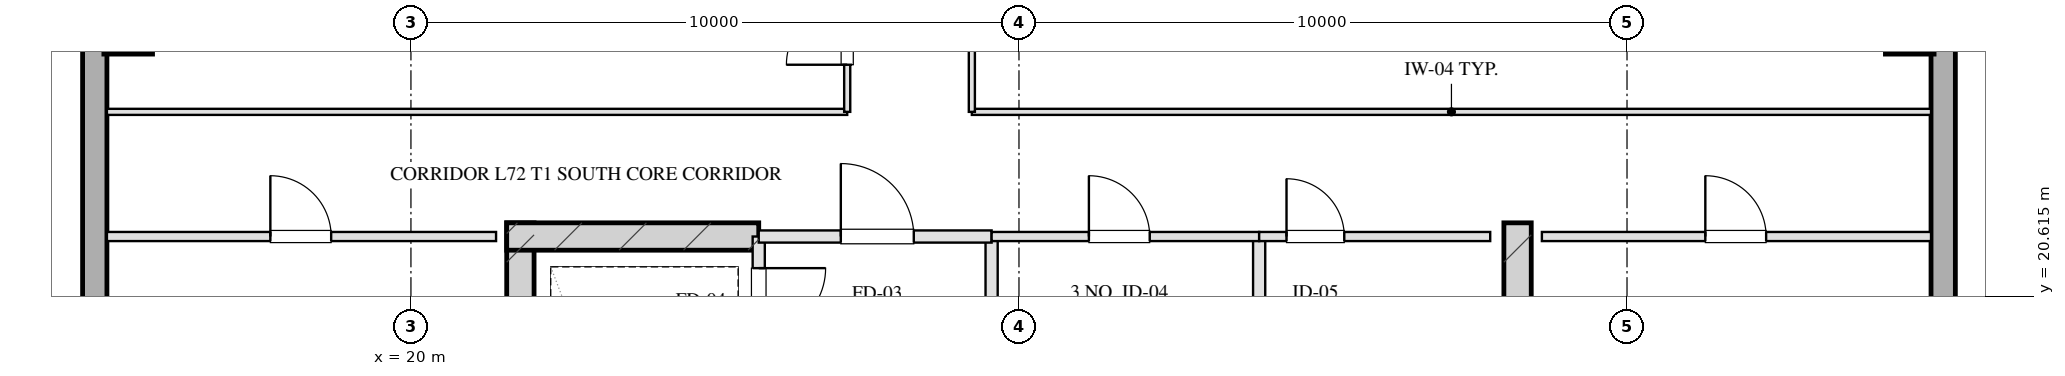
"""IFC4 building model, lengths in metres.
Left out: names, types, materials, properties, quantities, classifications, styles, units other than length and angle.
Written with IfcOpenShell. Run it as: python <this file> out.ifc"""

import sys

from ifc_helpers import new_model, si_unit, direction, frame, frame_2d, origin, origin_2d, place, context, subcontext, project, spatial, rectangle, hollow_rectangle, extrude, element, fill, save


model = new_model("IFC4")
c1 = context("Model", 3, precision=1e-05, world=origin(), true_north=direction((0.0, 1.0)))
c2 = subcontext(c1, "Body", "Model", "MODEL_VIEW")
j1 = project(units=[si_unit("LENGTHUNIT", "METRE"), si_unit("PLANEANGLEUNIT", "RADIAN")], contexts=[c1])
p1 = place(None, origin())
s1 = spatial("IfcSite", under=j1, at=p1, CompositionType="ELEMENT")
p2 = place(p1, origin())
s2 = spatial("IfcBuilding", under=s1, at=p2, CompositionType="ELEMENT")
p3 = place(p2, frame((0.0, 0.0, 263.2)))
s3 = spatial("IfcBuildingStorey", under=s2, at=p3, CompositionType="ELEMENT", Elevation=263.2)
for number, where, z_axis, x_axis in (
    (1, (21.8, 21.825, 0.0), (0.0, 0.0, 1.0), (0.0, -1.0, 0.0)),
    (2, (38.2, 21.825, 0.0), (0.0, 0.0, 1.0), (0.0, -1.0, 0.0)),
):
    element("IfcWall", number, at=place(p3, frame(where, z_axis=z_axis, x_axis=x_axis)), inside=s3, PredefinedType="SHEAR", context=c2, shape_type="SweptSolid", body=[
        extrude(rectangle(XDim=9.33, YDim=0.45, at=frame_2d((4.665, 0.0))), origin(), (0.0, 0.0, 1.0), 3.2),
    ])
p4 = place(p3, frame((21.575, 21.6, 0.0), z_axis=(0.0, 0.0, 1.0), x_axis=(1.0, 0.0, 0.0)))
e3 = element("IfcWall", 3, at=p4, inside=s3, PredefinedType="SHEAR", context=c2, shape_type="SweptSolid", body=[
    extrude(rectangle(XDim=4.145, YDim=0.45, at=frame_2d((2.073, 0.0))), origin(), (0.0, 0.0, 1.0), 3.2),
])
for number, where, z_axis, x_axis in (
    (4, (15.35, 25.0, 0.0), (0.0, 0.0, 1.0), (1.0, 0.0, 0.0)),
    (5, (44.65, 25.0, 0.0), (0.0, 0.0, 1.0), (1.0, 0.0, 0.0)),
):
    element("IfcColumn", number, at=place(p3, frame(where, z_axis=z_axis, x_axis=x_axis)), inside=s3, PredefinedType="COLUMN", context=c2, shape_type="SweptSolid", body=[
        extrude(hollow_rectangle(XDim=0.8, YDim=0.8, WallThickness=0.028, at=origin_2d()), origin(), (0.0, 0.0, 1.0), 3.201),
    ])
p5 = place(p3, frame((14.8, 13.1, 0.0), z_axis=(0.0, 0.0, 1.0), x_axis=(0.0, 1.0, 0.0)))
e6 = element("IfcWall", 6, at=p5, inside=s3, PredefinedType="SOLIDWALL", context=c2, shape_type="SweptSolid", body=[
    extrude(rectangle(XDim=41.8, YDim=0.4, at=frame_2d((20.9, 0.0))), origin(), (0.0, 0.0, 1.0), 2.36),
])
p6 = place(p5, frame((13.525, 0.0, 0.75)))
e7 = element("IfcOpeningElement", 7, at=p6, cuts=e6, PredefinedType="OPENING", context=c2, shape_type="SweptSolid", body=[
    extrude(rectangle(XDim=1.95, YDim=1.21, at=frame_2d((0.975, 0.605))), frame((0.0, 0.21, 0.0), z_axis=(0.0, -1.0, 0.0), x_axis=(1.0, 0.0, 0.0)), (0.0, 0.0, 1.0), 0.42),
])
p7 = place(p5, frame((17.325, 0.0, 0.75)))
e8 = element("IfcOpeningElement", 8, at=p7, cuts=e6, PredefinedType="OPENING", context=c2, shape_type="SweptSolid", body=[
    extrude(rectangle(XDim=1.95, YDim=1.21, at=frame_2d((0.975, 0.605))), frame((0.0, 0.21, 0.0), z_axis=(0.0, -1.0, 0.0), x_axis=(1.0, 0.0, 0.0)), (0.0, 0.0, 1.0), 0.42),
])
p8 = place(p5, frame((22.525, 0.0, 0.75)))
e9 = element("IfcOpeningElement", 9, at=p8, cuts=e6, PredefinedType="OPENING", context=c2, shape_type="SweptSolid", body=[
    extrude(rectangle(XDim=1.95, YDim=1.21, at=frame_2d((0.975, 0.605))), frame((0.0, 0.21, 0.0), z_axis=(0.0, -1.0, 0.0), x_axis=(1.0, 0.0, 0.0)), (0.0, 0.0, 1.0), 0.42),
])
p9 = place(p5, frame((26.325, 0.0, 0.75)))
e10 = element("IfcOpeningElement", 10, at=p9, cuts=e6, PredefinedType="OPENING", context=c2, shape_type="SweptSolid", body=[
    extrude(rectangle(XDim=1.95, YDim=1.21, at=frame_2d((0.975, 0.605))), frame((0.0, 0.21, 0.0), z_axis=(0.0, -1.0, 0.0), x_axis=(1.0, 0.0, 0.0)), (0.0, 0.0, 1.0), 0.42),
])
p10 = place(p3, frame((45.2, 54.9, 0.0), z_axis=(0.0, 0.0, 1.0), x_axis=(0.0, -1.0, 0.0)))
e11 = element("IfcWall", 11, at=p10, inside=s3, PredefinedType="SOLIDWALL", context=c2, shape_type="SweptSolid", body=[
    extrude(rectangle(XDim=41.8, YDim=0.4, at=frame_2d((20.9, 0.0))), origin(), (0.0, 0.0, 1.0), 2.36),
])
p11 = place(p10, frame((26.325, 0.0, 0.75)))
e12 = element("IfcOpeningElement", 12, at=p11, cuts=e11, PredefinedType="OPENING", context=c2, shape_type="SweptSolid", body=[
    extrude(rectangle(XDim=1.95, YDim=1.21, at=frame_2d((0.975, 0.605))), frame((0.0, 0.21, 0.0), z_axis=(0.0, -1.0, 0.0), x_axis=(1.0, 0.0, 0.0)), (0.0, 0.0, 1.0), 0.42),
])
p12 = place(p10, frame((22.525, 0.0, 0.75)))
e13 = element("IfcOpeningElement", 13, at=p12, cuts=e11, PredefinedType="OPENING", context=c2, shape_type="SweptSolid", body=[
    extrude(rectangle(XDim=1.95, YDim=1.21, at=frame_2d((0.975, 0.605))), frame((0.0, 0.21, 0.0), z_axis=(0.0, -1.0, 0.0), x_axis=(1.0, 0.0, 0.0)), (0.0, 0.0, 1.0), 0.42),
])
p13 = place(p10, frame((17.325, 0.0, 0.75)))
e14 = element("IfcOpeningElement", 14, at=p13, cuts=e11, PredefinedType="OPENING", context=c2, shape_type="SweptSolid", body=[
    extrude(rectangle(XDim=1.95, YDim=1.21, at=frame_2d((0.975, 0.605))), frame((0.0, 0.21, 0.0), z_axis=(0.0, -1.0, 0.0), x_axis=(1.0, 0.0, 0.0)), (0.0, 0.0, 1.0), 0.42),
])
p14 = place(p10, frame((13.525, 0.0, 0.75)))
e15 = element("IfcOpeningElement", 15, at=p14, cuts=e11, PredefinedType="OPENING", context=c2, shape_type="SweptSolid", body=[
    extrude(rectangle(XDim=1.95, YDim=1.21, at=frame_2d((0.975, 0.605))), frame((0.0, 0.21, 0.0), z_axis=(0.0, -1.0, 0.0), x_axis=(1.0, 0.0, 0.0)), (0.0, 0.0, 1.0), 0.42),
])
p15 = place(p3, frame((25.72, 21.6, 0.0), z_axis=(0.0, 0.0, 1.0), x_axis=(0.0, -1.0, 0.0)))
e16 = element("IfcWall", 16, at=p15, inside=s3, PredefinedType="PARTITIONING", context=c2, shape_type="SweptSolid", body=[
    extrude(rectangle(XDim=1.9, YDim=0.2, at=frame_2d((0.95, 0.0))), origin(), (0.0, 0.0, 1.0), 2.925),
])
p16 = place(p15, frame((0.52, 0.0, 0.0)))
e17 = element("IfcOpeningElement", 17, at=p16, cuts=e16, PredefinedType="OPENING", context=c2, shape_type="SweptSolid", body=[
    extrude(rectangle(XDim=1.1, YDim=2.05, at=frame_2d((0.55, 1.025))), frame((0.0, 0.11, 0.0), z_axis=(0.0, -1.0, 0.0), x_axis=(1.0, 0.0, 0.0)), (0.0, 0.0, 1.0), 0.22),
])
p17 = place(p3, frame((29.55, 21.6, 0.0), z_axis=(0.0, 0.0, 1.0), x_axis=(0.0, -1.0, 0.0)))
e18 = element("IfcWall", 18, at=p17, inside=s3, PredefinedType="PARTITIONING", context=c2, shape_type="SweptSolid", body=[
    extrude(rectangle(XDim=8.43, YDim=0.2, at=frame_2d((4.215, 0.0))), origin(), (0.0, 0.0, 1.0), 2.925),
])
p18 = place(p3, frame((25.72, 21.6, 0.0), z_axis=(0.0, 0.0, 1.0), x_axis=(1.0, 0.0, 0.0)))
e19 = element("IfcWall", 19, at=p18, inside=s3, PredefinedType="PARTITIONING", context=c2, shape_type="SweptSolid", body=[
    extrude(rectangle(XDim=3.83, YDim=0.2, at=frame_2d((1.915, 0.0))), origin(), (0.0, 0.0, 1.0), 2.925),
])
p19 = place(p18, frame((1.35, 0.0, 0.0)))
e20 = element("IfcOpeningElement", 20, at=p19, cuts=e19, PredefinedType="OPENING", context=c2, shape_type="SweptSolid", body=[
    extrude(rectangle(XDim=1.2, YDim=2.05, at=frame_2d((0.6, 1.025))), frame((0.0, 0.11, 0.0), z_axis=(0.0, -1.0, 0.0), x_axis=(1.0, 0.0, 0.0)), (0.0, 0.0, 1.0), 0.22),
])
p20 = place(p3, frame((33.95, 21.6, 0.0), z_axis=(0.0, 0.0, 1.0), x_axis=(0.0, -1.0, 0.0)))
e21 = element("IfcWall", 21, at=p20, inside=s3, PredefinedType="PARTITIONING", context=c2, shape_type="SweptSolid", body=[
    extrude(rectangle(XDim=8.43, YDim=0.2, at=frame_2d((4.215, 0.0))), origin(), (0.0, 0.0, 1.0), 2.925),
])
p21 = place(p3, frame((29.55, 21.6, 0.0), z_axis=(0.0, 0.0, 1.0), x_axis=(1.0, 0.0, 0.0)))
e22 = element("IfcWall", 22, at=p21, inside=s3, PredefinedType="PARTITIONING", context=c2, shape_type="SweptSolid", body=[
    extrude(rectangle(XDim=4.4, YDim=0.15, at=frame_2d((2.2, 0.0))), origin(), (0.0, 0.0, 1.0), 2.925),
])
p22 = place(p21, frame((1.6, 0.0, 0.0)))
e23 = element("IfcOpeningElement", 23, at=p22, cuts=e22, PredefinedType="OPENING", context=c2, shape_type="SweptSolid", body=[
    extrude(rectangle(XDim=1.0, YDim=2.05, at=frame_2d((0.5, 1.025))), frame((0.0, 0.085, 0.0), z_axis=(0.0, -1.0, 0.0), x_axis=(1.0, 0.0, 0.0)), (0.0, 0.0, 1.0), 0.17),
])
p23 = place(p3, frame((33.95, 21.6, 0.0), z_axis=(0.0, 0.0, 1.0), x_axis=(1.0, 0.0, 0.0)))
e24 = element("IfcWall", 24, at=p23, inside=s3, PredefinedType="PARTITIONING", context=c2, shape_type="SweptSolid", body=[
    extrude(rectangle(XDim=3.8, YDim=0.15, at=frame_2d((1.9, 0.0))), origin(), (0.0, 0.0, 1.0), 2.925),
])
p24 = place(p23, frame((0.45, 0.0, 0.0)))
e25 = element("IfcOpeningElement", 25, at=p24, cuts=e24, PredefinedType="OPENING", context=c2, shape_type="SweptSolid", body=[
    extrude(rectangle(XDim=0.95, YDim=2.05, at=frame_2d((0.475, 1.025))), frame((0.0, 0.085, 0.0), z_axis=(0.0, -1.0, 0.0), x_axis=(1.0, 0.0, 0.0)), (0.0, 0.0, 1.0), 0.17),
])
p25 = place(p3, frame((15.0, 21.6, 0.0), z_axis=(0.0, 0.0, 1.0), x_axis=(1.0, 0.0, 0.0)))
e26 = element("IfcWall", 26, at=p25, inside=s3, PredefinedType="PARTITIONING", context=c2, shape_type="SweptSolid", body=[
    extrude(rectangle(XDim=6.4, YDim=0.15, at=frame_2d((3.2, 0.0))), origin(), (0.0, 0.0, 1.0), 2.925),
])
p26 = place(p25, frame((2.688, 0.0, 0.0)))
e27 = element("IfcOpeningElement", 27, at=p26, cuts=e26, PredefinedType="OPENING", context=c2, shape_type="SweptSolid", body=[
    extrude(rectangle(XDim=1.0, YDim=2.05, at=frame_2d((0.5, 1.025))), frame((0.0, 0.085, 0.0), z_axis=(0.0, -1.0, 0.0), x_axis=(1.0, 0.0, 0.0)), (0.0, 0.0, 1.0), 0.17),
])
p27 = place(p3, frame((38.6, 21.6, 0.0), z_axis=(0.0, 0.0, 1.0), x_axis=(1.0, 0.0, 0.0)))
e28 = element("IfcWall", 28, at=p27, inside=s3, PredefinedType="PARTITIONING", context=c2, shape_type="SweptSolid", body=[
    extrude(rectangle(XDim=6.4, YDim=0.15, at=frame_2d((3.2, 0.0))), origin(), (0.0, 0.0, 1.0), 2.925),
])
p28 = place(p27, frame((2.688, 0.0, 0.0)))
e29 = element("IfcOpeningElement", 29, at=p28, cuts=e28, PredefinedType="OPENING", context=c2, shape_type="SweptSolid", body=[
    extrude(rectangle(XDim=1.0, YDim=2.05, at=frame_2d((0.5, 1.025))), frame((0.0, 0.085, 0.0), z_axis=(0.0, -1.0, 0.0), x_axis=(1.0, 0.0, 0.0)), (0.0, 0.0, 1.0), 0.17),
])
p29 = place(p3, frame((15.0, 23.65, 0.0), z_axis=(0.0, 0.0, 1.0), x_axis=(1.0, 0.0, 0.0)))
e30 = element("IfcWall", 30, at=p29, inside=s3, PredefinedType="MOVABLE", context=c2, shape_type="SweptSolid", body=[
    extrude(rectangle(XDim=12.175, YDim=0.1, at=frame_2d((6.087, 0.0))), origin(), (0.0, 0.0, 1.0), 2.925),
])
p30 = place(p3, frame((29.225, 23.65, 0.0), z_axis=(0.0, 0.0, 1.0), x_axis=(1.0, 0.0, 0.0)))
e31 = element("IfcWall", 31, at=p30, inside=s3, PredefinedType="MOVABLE", context=c2, shape_type="SweptSolid", body=[
    extrude(rectangle(XDim=15.775, YDim=0.1, at=frame_2d((7.887, 0.0))), origin(), (0.0, 0.0, 1.0), 2.925),
])
p31 = place(p3, frame((27.175, 23.65, 0.0), z_axis=(0.0, 0.0, 1.0), x_axis=(0.0, 1.0, 0.0)))
e32 = element("IfcWall", 32, at=p31, inside=s3, PredefinedType="MOVABLE", context=c2, shape_type="SweptSolid", body=[
    extrude(rectangle(XDim=20.7, YDim=0.1, at=frame_2d((10.35, 0.0))), origin(), (0.0, 0.0, 1.0), 2.925),
])
p32 = place(p31, frame((0.775, 0.0, 0.0)))
e33 = element("IfcOpeningElement", 33, at=p32, cuts=e32, PredefinedType="OPENING", context=c2, shape_type="SweptSolid", body=[
    extrude(rectangle(XDim=1.0, YDim=2.05, at=frame_2d((0.5, 1.025))), frame((0.0, 0.06, 0.0), z_axis=(0.0, -1.0, 0.0), x_axis=(1.0, 0.0, 0.0)), (0.0, 0.0, 1.0), 0.12),
])
p33 = place(p31, frame((3.95, 0.0, 0.0)))
e34 = element("IfcOpeningElement", 34, at=p33, cuts=e32, PredefinedType="OPENING", context=c2, shape_type="SweptSolid", body=[
    extrude(rectangle(XDim=1.05, YDim=2.05, at=frame_2d((0.525, 1.025))), frame((0.0, 0.06, 0.0), z_axis=(0.0, -1.0, 0.0), x_axis=(1.0, 0.0, 0.0)), (0.0, 0.0, 1.0), 0.12),
])
p34 = place(p31, frame((8.364, 0.0, 0.0)))
e35 = element("IfcOpeningElement", 35, at=p34, cuts=e32, PredefinedType="OPENING", context=c2, shape_type="SweptSolid", body=[
    extrude(rectangle(XDim=0.85, YDim=2.05, at=frame_2d((0.425, 1.025))), frame((0.0, 0.06, 0.0), z_axis=(0.0, -1.0, 0.0), x_axis=(1.0, 0.0, 0.0)), (0.0, 0.0, 1.0), 0.12),
])
p35 = place(p31, frame((12.844, 0.0, 0.0)))
e36 = element("IfcOpeningElement", 36, at=p35, cuts=e32, PredefinedType="OPENING", context=c2, shape_type="SweptSolid", body=[
    extrude(rectangle(XDim=1.0, YDim=2.05, at=frame_2d((0.5, 1.025))), frame((0.0, 0.06, 0.0), z_axis=(0.0, -1.0, 0.0), x_axis=(1.0, 0.0, 0.0)), (0.0, 0.0, 1.0), 0.12),
])
p36 = place(p31, frame((16.364, 0.0, 0.0)))
e37 = element("IfcOpeningElement", 37, at=p36, cuts=e32, PredefinedType="OPENING", context=c2, shape_type="SweptSolid", body=[
    extrude(rectangle(XDim=1.0, YDim=2.05, at=frame_2d((0.5, 1.025))), frame((0.0, 0.06, 0.0), z_axis=(0.0, -1.0, 0.0), x_axis=(1.0, 0.0, 0.0)), (0.0, 0.0, 1.0), 0.12),
])
p37 = place(p31, frame((19.058, 0.0, 0.0)))
e38 = element("IfcOpeningElement", 38, at=p37, cuts=e32, PredefinedType="OPENING", context=c2, shape_type="SweptSolid", body=[
    extrude(rectangle(XDim=1.0, YDim=2.05, at=frame_2d((0.5, 1.025))), frame((0.0, 0.06, 0.0), z_axis=(0.0, -1.0, 0.0), x_axis=(1.0, 0.0, 0.0)), (0.0, 0.0, 1.0), 0.12),
])
p38 = place(p3, frame((29.225, 23.65, 0.0), z_axis=(0.0, 0.0, 1.0), x_axis=(0.0, 1.0, 0.0)))
e39 = element("IfcWall", 39, at=p38, inside=s3, PredefinedType="MOVABLE", context=c2, shape_type="SweptSolid", body=[
    extrude(rectangle(XDim=20.7, YDim=0.1, at=frame_2d((10.35, 0.0))), origin(), (0.0, 0.0, 1.0), 2.925),
])
p39 = place(p38, frame((2.175, 0.0, 0.0)))
e40 = element("IfcOpeningElement", 40, at=p39, cuts=e39, PredefinedType="OPENING", context=c2, shape_type="SweptSolid", body=[
    extrude(rectangle(XDim=1.0, YDim=2.05, at=frame_2d((0.5, 1.025))), frame((0.0, 0.06, 0.0), z_axis=(0.0, -1.0, 0.0), x_axis=(1.0, 0.0, 0.0)), (0.0, 0.0, 1.0), 0.12),
])
p40 = place(p38, frame((7.69, 0.0, 0.0)))
e41 = element("IfcOpeningElement", 41, at=p40, cuts=e39, PredefinedType="OPENING", context=c2, shape_type="SweptSolid", body=[
    extrude(rectangle(XDim=1.0, YDim=2.05, at=frame_2d((0.5, 1.025))), frame((0.0, 0.06, 0.0), z_axis=(0.0, -1.0, 0.0), x_axis=(1.0, 0.0, 0.0)), (0.0, 0.0, 1.0), 0.12),
])
p41 = place(p38, frame((12.69, 0.0, 0.0)))
e42 = element("IfcOpeningElement", 42, at=p41, cuts=e39, PredefinedType="OPENING", context=c2, shape_type="SweptSolid", body=[
    extrude(rectangle(XDim=1.05, YDim=2.05, at=frame_2d((0.525, 1.025))), frame((0.0, 0.06, 0.0), z_axis=(0.0, -1.0, 0.0), x_axis=(1.0, 0.0, 0.0)), (0.0, 0.0, 1.0), 0.12),
])
p42 = place(p38, frame((17.525, 0.0, 0.0)))
e43 = element("IfcOpeningElement", 43, at=p42, cuts=e39, PredefinedType="OPENING", context=c2, shape_type="SweptSolid", body=[
    extrude(rectangle(XDim=1.0, YDim=2.05, at=frame_2d((0.5, 1.025))), frame((0.0, 0.06, 0.0), z_axis=(0.0, -1.0, 0.0), x_axis=(1.0, 0.0, 0.0)), (0.0, 0.0, 1.0), 0.12),
])
p43 = place(p16, origin())
e44 = element("IfcDoor", 44, at=p43, inside=s3, OperationType="SINGLE_SWING_LEFT", PredefinedType="DOOR", context=c2, shape_type="SweptSolid", body=[
    extrude(rectangle(XDim=1.1, YDim=2.05, at=frame_2d((0.55, 1.025))), frame((0.0, 0.025, 0.0), z_axis=(0.0, -1.0, 0.0), x_axis=(1.0, 0.0, 0.0)), (0.0, 0.0, 1.0), 0.05),
])
fill(e17, e44)
p44 = place(p19, origin())
e45 = element("IfcDoor", 45, at=p44, inside=s3, OperationType="SINGLE_SWING_LEFT", PredefinedType="DOOR", context=c2, shape_type="SweptSolid", body=[
    extrude(rectangle(XDim=1.2, YDim=2.05, at=frame_2d((0.6, 1.025))), frame((0.0, 0.025, 0.0), z_axis=(0.0, -1.0, 0.0), x_axis=(1.0, 0.0, 0.0)), (0.0, 0.0, 1.0), 0.05),
])
fill(e20, e45)
p45 = place(p22, origin())
e46 = element("IfcDoor", 46, at=p45, inside=s3, OperationType="SINGLE_SWING_LEFT", PredefinedType="DOOR", context=c2, shape_type="SweptSolid", body=[
    extrude(rectangle(XDim=1.0, YDim=2.05, at=frame_2d((0.5, 1.025))), frame((0.0, 0.025, 0.0), z_axis=(0.0, -1.0, 0.0), x_axis=(1.0, 0.0, 0.0)), (0.0, 0.0, 1.0), 0.05),
])
fill(e23, e46)
p46 = place(p24, origin())
e47 = element("IfcDoor", 47, at=p46, inside=s3, OperationType="SINGLE_SWING_LEFT", PredefinedType="DOOR", context=c2, shape_type="SweptSolid", body=[
    extrude(rectangle(XDim=0.95, YDim=2.05, at=frame_2d((0.475, 1.025))), frame((0.0, 0.025, 0.0), z_axis=(0.0, -1.0, 0.0), x_axis=(1.0, 0.0, 0.0)), (0.0, 0.0, 1.0), 0.05),
])
fill(e25, e47)
p47 = place(p26, origin())
e48 = element("IfcDoor", 48, at=p47, inside=s3, OperationType="SINGLE_SWING_LEFT", PredefinedType="DOOR", context=c2, shape_type="SweptSolid", body=[
    extrude(rectangle(XDim=1.0, YDim=2.05, at=frame_2d((0.5, 1.025))), frame((0.0, 0.025, 0.0), z_axis=(0.0, -1.0, 0.0), x_axis=(1.0, 0.0, 0.0)), (0.0, 0.0, 1.0), 0.05),
])
fill(e27, e48)
p48 = place(p28, origin())
e49 = element("IfcDoor", 49, at=p48, inside=s3, OperationType="SINGLE_SWING_LEFT", PredefinedType="DOOR", context=c2, shape_type="SweptSolid", body=[
    extrude(rectangle(XDim=1.0, YDim=2.05, at=frame_2d((0.5, 1.025))), frame((0.0, 0.025, 0.0), z_axis=(0.0, -1.0, 0.0), x_axis=(1.0, 0.0, 0.0)), (0.0, 0.0, 1.0), 0.05),
])
fill(e29, e49)
p49 = place(p32, origin())
e50 = element("IfcDoor", 50, at=p49, inside=s3, OperationType="SINGLE_SWING_LEFT", PredefinedType="DOOR", context=c2, shape_type="SweptSolid", body=[
    extrude(rectangle(XDim=1.0, YDim=2.05, at=frame_2d((0.5, 1.025))), frame((0.0, 0.025, 0.0), z_axis=(0.0, -1.0, 0.0), x_axis=(1.0, 0.0, 0.0)), (0.0, 0.0, 1.0), 0.05),
])
fill(e33, e50)
save(model, sys.argv[1])
